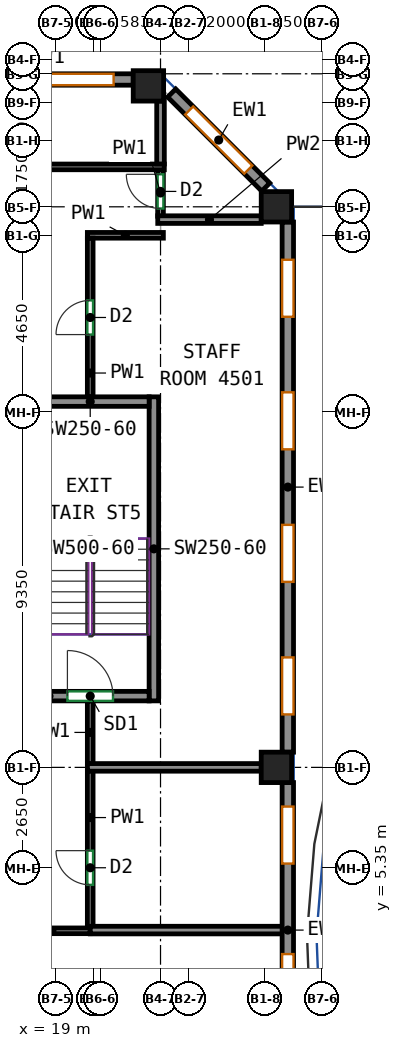
"""IFC4 building model, lengths in metres.
Left out: names, types, materials, properties, quantities, classifications, styles, units other than length and angle.
Written with IfcOpenShell. Run it as: python <this file> out.ifc"""

import sys

from ifc_helpers import new_model, si_unit, direction, frame, frame_2d, origin, origin_2d, place, context, subcontext, project, spatial, rectangle, extrude, source, transform, mapped, element, fill, save


model = new_model("IFC4")
c1 = context("Model", 3, precision=1e-05, world=origin(), true_north=direction((0.0, 1.0)))
c2 = subcontext(c1, "Body", "Model", "MODEL_VIEW")
j1 = project(units=[si_unit("LENGTHUNIT", "METRE"), si_unit("PLANEANGLEUNIT", "RADIAN")], contexts=[c1])
p1 = place(None, origin())
s1 = spatial("IfcSite", under=j1, at=p1, CompositionType="ELEMENT")
p2 = place(p1, origin())
s2 = spatial("IfcBuilding", under=s1, at=p2, CompositionType="ELEMENT")
p3 = place(p2, frame((0.0, 0.0, 188.9)))
s3 = spatial("IfcBuildingStorey", under=s2, at=p3, CompositionType="ELEMENT", Elevation=188.9)
m1 = source(origin(), c2, "Body", "SweptSolid", [
    extrude(rectangle(XDim=0.8, YDim=0.8, at=origin_2d()), origin(), (0.0, 0.0, 1.0), 3.12),
])
for number, where, z_axis, x_axis in (
    (1, (21.432, 25.932, 0.0), (0.0, 0.0, 1.0), (1.0, 0.0, 0.0)),
    (2, (24.8, 8.0, 0.0), (0.0, 0.0, 1.0), (1.0, 0.0, 0.0)),
    (3, (24.8, 22.75, 0.0), (0.0, 0.0, 1.0), (1.0, 0.0, 0.0)),
):
    element("IfcColumn", number, at=place(p3, frame(where, z_axis=z_axis, x_axis=x_axis)), inside=s3, PredefinedType="COLUMN", context=c2, shape_type="MappedRepresentation", body=[
        mapped(m1, transform((0.0, 0.0, 0.0))),
    ])
m2 = source(origin(), c2, "Body", "SweptSolid", [
    extrude(rectangle(XDim=8.0, YDim=0.25, at=frame_2d((4.0, 0.0))), origin(), (0.0, 0.0, 1.0), 3.12),
])
p4 = place(p3, frame((21.575, 9.75, 0.0), z_axis=(0.0, 0.0, 1.0), x_axis=(0.0, 1.0, 0.0)))
e4 = element("IfcWall", 4, at=p4, inside=s3, PredefinedType="SHEAR", context=c2, shape_type="MappedRepresentation", body=[
    mapped(m2, transform((0.0, 0.0, 0.0))),
])
m3 = source(origin(), c2, "Body", "SweptSolid", [
    extrude(rectangle(XDim=3.1, YDim=0.25, at=frame_2d((1.55, 0.0))), origin(), (0.0, 0.0, 1.0), 3.12),
])
p5 = place(p3, frame((18.35, 9.875, 0.0), z_axis=(0.0, 0.0, 1.0), x_axis=(1.0, 0.0, 0.0)))
e5 = element("IfcWall", 5, at=p5, inside=s3, PredefinedType="SHEAR", context=c2, shape_type="MappedRepresentation", body=[
    mapped(m3, transform((0.0, 0.0, 0.0))),
])
p6 = place(p5, frame((0.95, 0.0, 0.0)))
e6 = element("IfcOpeningElement", 6, at=p6, cuts=e5, PredefinedType="OPENING", context=c2, shape_type="SweptSolid", body=[
    extrude(rectangle(XDim=1.2, YDim=2.1, at=frame_2d((0.6, 1.05))), frame((0.0, 0.135, 0.0), z_axis=(0.0, -1.0, 0.0), x_axis=(1.0, 0.0, 0.0)), (0.0, 0.0, 1.0), 0.27),
])
p7 = place(p3, frame((18.35, 17.625, 0.0), z_axis=(0.0, 0.0, 1.0), x_axis=(1.0, 0.0, 0.0)))
e7 = element("IfcWall", 7, at=p7, inside=s3, PredefinedType="SHEAR", context=c2, shape_type="MappedRepresentation", body=[
    mapped(m3, transform((0.0, 0.0, 0.0))),
])
m4 = source(origin(), c2, "Body", "SweptSolid", [
    extrude(rectangle(XDim=7.763, YDim=0.3, at=frame_2d((3.881, 0.0))), origin(), (0.0, 0.0, 1.0), 3.12),
])
p8 = place(p3, frame((25.1, -0.163, 0.0), z_axis=(0.0, 0.0, 1.0), x_axis=(0.0, 1.0, 0.0)))
e8 = element("IfcWall", 8, at=p8, inside=s3, PredefinedType="SOLIDWALL", context=c2, shape_type="MappedRepresentation", body=[
    mapped(m4, transform((0.0, 0.0, 0.0))),
])
p9 = place(p8, frame((1.75, 0.0, 0.85)))
e9 = element("IfcOpeningElement", 9, at=p9, cuts=e8, PredefinedType="OPENING", context=c2, shape_type="SweptSolid", body=[
    extrude(rectangle(XDim=1.5, YDim=1.95, at=frame_2d((0.75, 0.975))), frame((0.0, 0.16, 0.0), z_axis=(0.0, -1.0, 0.0), x_axis=(1.0, 0.0, 0.0)), (0.0, 0.0, 1.0), 0.32),
])
p10 = place(p8, frame((5.631, 0.0, 0.85)))
e10 = element("IfcOpeningElement", 10, at=p10, cuts=e8, PredefinedType="OPENING", context=c2, shape_type="SweptSolid", body=[
    extrude(rectangle(XDim=1.5, YDim=1.95, at=frame_2d((0.75, 0.975))), frame((0.0, 0.16, 0.0), z_axis=(0.0, -1.0, 0.0), x_axis=(1.0, 0.0, 0.0)), (0.0, 0.0, 1.0), 0.32),
])
m5 = source(origin(), c2, "Body", "SweptSolid", [
    extrude(rectangle(XDim=13.95, YDim=0.3, at=frame_2d((6.975, 0.0))), origin(), (0.0, 0.0, 1.0), 3.12),
])
p11 = place(p3, frame((25.1, 8.4, 0.0), z_axis=(0.0, 0.0, 1.0), x_axis=(0.0, 1.0, 0.0)))
e11 = element("IfcWall", 11, at=p11, inside=s3, PredefinedType="SOLIDWALL", context=c2, shape_type="MappedRepresentation", body=[
    mapped(m5, transform((0.0, 0.0, 0.0))),
])
p12 = place(p11, frame((0.994, 0.0, 0.85)))
e12 = element("IfcOpeningElement", 12, at=p12, cuts=e11, PredefinedType="OPENING", context=c2, shape_type="SweptSolid", body=[
    extrude(rectangle(XDim=1.5, YDim=1.95, at=frame_2d((0.75, 0.975))), frame((0.0, 0.16, 0.0), z_axis=(0.0, -1.0, 0.0), x_axis=(1.0, 0.0, 0.0)), (0.0, 0.0, 1.0), 0.32),
])
p13 = place(p11, frame((4.481, 0.0, 0.85)))
e13 = element("IfcOpeningElement", 13, at=p13, cuts=e11, PredefinedType="OPENING", context=c2, shape_type="SweptSolid", body=[
    extrude(rectangle(XDim=1.5, YDim=1.95, at=frame_2d((0.75, 0.975))), frame((0.0, 0.16, 0.0), z_axis=(0.0, -1.0, 0.0), x_axis=(1.0, 0.0, 0.0)), (0.0, 0.0, 1.0), 0.32),
])
p14 = place(p11, frame((7.969, 0.0, 0.85)))
e14 = element("IfcOpeningElement", 14, at=p14, cuts=e11, PredefinedType="OPENING", context=c2, shape_type="SweptSolid", body=[
    extrude(rectangle(XDim=1.5, YDim=1.95, at=frame_2d((0.75, 0.975))), frame((0.0, 0.16, 0.0), z_axis=(0.0, -1.0, 0.0), x_axis=(1.0, 0.0, 0.0)), (0.0, 0.0, 1.0), 0.32),
])
p15 = place(p11, frame((11.456, 0.0, 0.85)))
e15 = element("IfcOpeningElement", 15, at=p15, cuts=e11, PredefinedType="OPENING", context=c2, shape_type="SweptSolid", body=[
    extrude(rectangle(XDim=1.5, YDim=1.95, at=frame_2d((0.75, 0.975))), frame((0.0, 0.16, 0.0), z_axis=(0.0, -1.0, 0.0), x_axis=(1.0, 0.0, 0.0)), (0.0, 0.0, 1.0), 0.32),
])
m6 = source(origin(), c2, "Body", "SweptSolid", [
    extrude(rectangle(XDim=3.5, YDim=0.3, at=frame_2d((1.75, 0.0))), origin(), (0.0, 0.0, 1.0), 3.12),
])
p16 = place(p3, frame((24.519, 23.269, 0.0), z_axis=(0.0, 0.0, 1.0), x_axis=(-0.70707190453, 0.707141656123, 0.0)))
e16 = element("IfcWall", 16, at=p16, inside=s3, PredefinedType="SOLIDWALL", context=c2, shape_type="MappedRepresentation", body=[
    mapped(m6, transform((0.0, 0.0, 0.0))),
])
p17 = place(p16, frame((0.65, 0.0, 0.85)))
e17 = element("IfcOpeningElement", 17, at=p17, cuts=e16, PredefinedType="OPENING", context=c2, shape_type="SweptSolid", body=[
    extrude(rectangle(XDim=2.2, YDim=1.95, at=frame_2d((1.1, 0.975))), frame((0.0, 0.16, 0.0), z_axis=(0.0, -1.0, 0.0), x_axis=(1.0, 0.0, 0.0)), (0.0, 0.0, 1.0), 0.32),
])
m7 = source(origin(), c2, "Body", "SweptSolid", [
    extrude(rectangle(XDim=6.465, YDim=0.3, at=frame_2d((3.232, 0.0))), origin(), (0.0, 0.0, 1.0), 3.12),
])
p18 = place(p3, frame((21.032, 26.1, 0.0), z_axis=(0.0, 0.0, 1.0), x_axis=(-1.0, 0.0, 0.0)))
e18 = element("IfcWall", 18, at=p18, inside=s3, PredefinedType="SOLIDWALL", context=c2, shape_type="MappedRepresentation", body=[
    mapped(m7, transform((0.0, 0.0, 0.0))),
])
p19 = place(p18, frame((0.516, 0.0, 0.85)))
e19 = element("IfcOpeningElement", 19, at=p19, cuts=e18, PredefinedType="OPENING", context=c2, shape_type="SweptSolid", body=[
    extrude(rectangle(XDim=2.2, YDim=1.95, at=frame_2d((1.1, 0.975))), frame((0.0, 0.16, 0.0), z_axis=(0.0, -1.0, 0.0), x_axis=(1.0, 0.0, 0.0)), (0.0, 0.0, 1.0), 0.32),
])
p20 = place(p18, frame((3.749, 0.0, 0.85)))
e20 = element("IfcOpeningElement", 20, at=p20, cuts=e18, PredefinedType="OPENING", context=c2, shape_type="SweptSolid", body=[
    extrude(rectangle(XDim=2.2, YDim=1.95, at=frame_2d((1.1, 0.975))), frame((0.0, 0.16, 0.0), z_axis=(0.0, -1.0, 0.0), x_axis=(1.0, 0.0, 0.0)), (0.0, 0.0, 1.0), 0.32),
])
p21 = place(p3, frame((19.9, 3.809, 0.0), z_axis=(0.0, 0.0, 1.0), x_axis=(0.0, 1.0, 0.0)))
e21 = element("IfcWall", 21, at=p21, inside=s3, PredefinedType="PARTITIONING", context=c2, shape_type="SweptSolid", body=[
    extrude(rectangle(XDim=4.101, YDim=0.15, at=frame_2d((2.05, 0.0))), origin(), (0.0, 0.0, 1.0), 3.12),
])
p22 = place(p21, frame((1.1, 0.0, 0.0)))
e22 = element("IfcOpeningElement", 22, at=p22, cuts=e21, PredefinedType="OPENING", context=c2, shape_type="SweptSolid", body=[
    extrude(rectangle(XDim=0.9, YDim=2.1, at=frame_2d((0.45, 1.05))), frame((0.0, 0.085, 0.0), z_axis=(0.0, -1.0, 0.0), x_axis=(1.0, 0.0, 0.0)), (0.0, 0.0, 1.0), 0.17),
])
p23 = place(p3, frame((19.825, 22.0, 0.0), z_axis=(0.0, 0.0, 1.0), x_axis=(1.0, 0.0, 0.0)))
e23 = element("IfcWall", 23, at=p23, inside=s3, PredefinedType="PARTITIONING", context=c2, shape_type="SweptSolid", body=[
    extrude(rectangle(XDim=2.0, YDim=0.15, at=frame_2d((1.0, 0.0))), origin(), (0.0, 0.0, 1.0), 3.12),
])
p24 = place(p3, frame((19.9, 17.75, 0.0), z_axis=(0.0, 0.0, 1.0), x_axis=(0.0, 1.0, 0.0)))
e24 = element("IfcWall", 24, at=p24, inside=s3, PredefinedType="PARTITIONING", context=c2, shape_type="SweptSolid", body=[
    extrude(rectangle(XDim=4.175, YDim=0.15, at=frame_2d((2.087, 0.0))), origin(), (0.0, 0.0, 1.0), 3.12),
])
p25 = place(p24, frame((1.638, 0.0, 0.0)))
e25 = element("IfcOpeningElement", 25, at=p25, cuts=e24, PredefinedType="OPENING", context=c2, shape_type="SweptSolid", body=[
    extrude(rectangle(XDim=0.9, YDim=2.1, at=frame_2d((0.45, 1.05))), frame((0.0, 0.085, 0.0), z_axis=(0.0, -1.0, 0.0), x_axis=(1.0, 0.0, 0.0)), (0.0, 0.0, 1.0), 0.17),
])
p26 = place(p3, frame((19.9, 8.09, 0.0), z_axis=(0.0, 0.0, 1.0), x_axis=(0.0, 1.0, 0.0)))
e26 = element("IfcWall", 26, at=p26, inside=s3, PredefinedType="PARTITIONING", context=c2, shape_type="SweptSolid", body=[
    extrude(rectangle(XDim=1.66, YDim=0.15, at=frame_2d((0.83, 0.0))), origin(), (0.0, 0.0, 1.0), 3.12),
])
p27 = place(p3, frame((21.75, 22.503, 0.0), z_axis=(0.0, 0.0, 1.0), x_axis=(0.0, 1.0, 0.0)))
e27 = element("IfcWall", 27, at=p27, inside=s3, PredefinedType="PARTITIONING", context=c2, shape_type="SweptSolid", body=[
    extrude(rectangle(XDim=1.222, YDim=0.15, at=frame_2d((0.611, 0.0))), origin(), (0.0, 0.0, 1.0), 3.12),
])
p28 = place(p27, frame((0.202, 0.0, 0.0)))
e28 = element("IfcOpeningElement", 28, at=p28, cuts=e27, PredefinedType="OPENING", context=c2, shape_type="SweptSolid", body=[
    extrude(rectangle(XDim=0.9, YDim=2.1, at=frame_2d((0.45, 1.05))), frame((0.0, 0.085, 0.0), z_axis=(0.0, -1.0, 0.0), x_axis=(1.0, 0.0, 0.0)), (0.0, 0.0, 1.0), 0.17),
])
p29 = place(p3, frame((17.884, 3.7, 0.0), z_axis=(0.0, 0.0, 1.0), x_axis=(1.0, 0.0, 0.0)))
e29 = element("IfcWall", 29, at=p29, inside=s3, PredefinedType="PARTITIONING", context=c2, shape_type="SweptSolid", body=[
    extrude(rectangle(XDim=2.016, YDim=0.15, at=frame_2d((1.008, 0.0))), origin(), (0.0, 0.0, 1.0), 3.12),
])
p30 = place(p3, frame((-20.059, 23.8, 0.0), z_axis=(0.0, 0.0, 1.0), x_axis=(1.0, 0.0, 0.0)))
e30 = element("IfcWall", 30, at=p30, inside=s3, PredefinedType="PARTITIONING", context=c2, shape_type="SweptSolid", body=[
    extrude(rectangle(XDim=41.909, YDim=0.15, at=frame_2d((20.955, 0.0))), origin(), (0.0, 0.0, 1.0), 3.12),
])
p31 = place(p30, frame((4.718, 0.0, 0.0)))
e31 = element("IfcOpeningElement", 31, at=p31, cuts=e30, PredefinedType="OPENING", context=c2, shape_type="SweptSolid", body=[
    extrude(rectangle(XDim=0.9, YDim=2.1, at=frame_2d((0.45, 1.05))), frame((0.0, 0.085, 0.0), z_axis=(0.0, -1.0, 0.0), x_axis=(1.0, 0.0, 0.0)), (0.0, 0.0, 1.0), 0.17),
])
p32 = place(p30, frame((30.079, 0.0, 0.0)))
e32 = element("IfcOpeningElement", 32, at=p32, cuts=e30, PredefinedType="OPENING", context=c2, shape_type="SweptSolid", body=[
    extrude(rectangle(XDim=1.0, YDim=2.1, at=frame_2d((0.5, 1.05))), frame((0.0, 0.085, 0.0), z_axis=(0.0, -1.0, 0.0), x_axis=(1.0, 0.0, 0.0)), (0.0, 0.0, 1.0), 0.17),
])
p33 = place(p3, frame((19.827, 8.0, 0.0), z_axis=(0.0, 0.0, 1.0), x_axis=(1.0, 0.0, 0.0)))
e33 = element("IfcWall", 33, at=p33, inside=s3, PredefinedType="PARTITIONING", context=c2, shape_type="SweptSolid", body=[
    extrude(rectangle(XDim=4.573, YDim=0.2, at=frame_2d((2.287, 0.0))), origin(), (0.0, 0.0, 1.0), 3.12),
])
p34 = place(p3, frame((19.902, 3.719, 0.0), z_axis=(0.0, 0.0, 1.0), x_axis=(1.0, 0.0, 0.0)))
e34 = element("IfcWall", 34, at=p34, inside=s3, PredefinedType="PARTITIONING", context=c2, shape_type="SweptSolid", body=[
    extrude(rectangle(XDim=5.098, YDim=0.2, at=frame_2d((2.549, 0.0))), origin(), (0.0, 0.0, 1.0), 3.12),
])
p35 = place(p3, frame((24.4, 22.413, 0.0), z_axis=(0.0, 0.0, 1.0), x_axis=(-1.0, 0.0, 0.0)))
e35 = element("IfcWall", 35, at=p35, inside=s3, PredefinedType="PARTITIONING", context=c2, shape_type="SweptSolid", body=[
    extrude(rectangle(XDim=2.723, YDim=0.2, at=frame_2d((1.361, 0.0))), origin(), (0.0, 0.0, 1.0), 2.52),
])
p36 = place(p3, frame((21.75, 25.532, 0.0), z_axis=(0.0, 0.0, 1.0), x_axis=(0.0, -1.0, 0.0)))
e36 = element("IfcWall", 36, at=p36, inside=s3, PredefinedType="PARTITIONING", context=c2, shape_type="SweptSolid", body=[
    extrude(rectangle(XDim=1.655, YDim=0.2, at=frame_2d((0.828, 0.0))), origin(), (0.0, 0.0, 1.0), 3.12),
])
p37 = place(p9, origin())
e37 = element("IfcWindow", 37, at=p37, inside=s3, PartitioningType="SINGLE_PANEL", PredefinedType="WINDOW", context=c2, shape_type="SweptSolid", body=[
    extrude(rectangle(XDim=1.5, YDim=1.95, at=frame_2d((0.75, 0.975))), frame((0.0, 0.03, 0.0), z_axis=(0.0, -1.0, 0.0), x_axis=(1.0, 0.0, 0.0)), (0.0, 0.0, 1.0), 0.06),
])
fill(e9, e37)
p38 = place(p10, origin())
e38 = element("IfcWindow", 38, at=p38, inside=s3, PartitioningType="SINGLE_PANEL", PredefinedType="WINDOW", context=c2, shape_type="SweptSolid", body=[
    extrude(rectangle(XDim=1.5, YDim=1.95, at=frame_2d((0.75, 0.975))), frame((0.0, 0.03, 0.0), z_axis=(0.0, -1.0, 0.0), x_axis=(1.0, 0.0, 0.0)), (0.0, 0.0, 1.0), 0.06),
])
fill(e10, e38)
p39 = place(p12, origin())
e39 = element("IfcWindow", 39, at=p39, inside=s3, PartitioningType="SINGLE_PANEL", PredefinedType="WINDOW", context=c2, shape_type="SweptSolid", body=[
    extrude(rectangle(XDim=1.5, YDim=1.95, at=frame_2d((0.75, 0.975))), frame((0.0, 0.03, 0.0), z_axis=(0.0, -1.0, 0.0), x_axis=(1.0, 0.0, 0.0)), (0.0, 0.0, 1.0), 0.06),
])
fill(e12, e39)
p40 = place(p13, origin())
e40 = element("IfcWindow", 40, at=p40, inside=s3, PartitioningType="SINGLE_PANEL", PredefinedType="WINDOW", context=c2, shape_type="SweptSolid", body=[
    extrude(rectangle(XDim=1.5, YDim=1.95, at=frame_2d((0.75, 0.975))), frame((0.0, 0.03, 0.0), z_axis=(0.0, -1.0, 0.0), x_axis=(1.0, 0.0, 0.0)), (0.0, 0.0, 1.0), 0.06),
])
fill(e13, e40)
p41 = place(p14, origin())
e41 = element("IfcWindow", 41, at=p41, inside=s3, PartitioningType="SINGLE_PANEL", PredefinedType="WINDOW", context=c2, shape_type="SweptSolid", body=[
    extrude(rectangle(XDim=1.5, YDim=1.95, at=frame_2d((0.75, 0.975))), frame((0.0, 0.03, 0.0), z_axis=(0.0, -1.0, 0.0), x_axis=(1.0, 0.0, 0.0)), (0.0, 0.0, 1.0), 0.06),
])
fill(e14, e41)
p42 = place(p15, origin())
e42 = element("IfcWindow", 42, at=p42, inside=s3, PartitioningType="SINGLE_PANEL", PredefinedType="WINDOW", context=c2, shape_type="SweptSolid", body=[
    extrude(rectangle(XDim=1.5, YDim=1.95, at=frame_2d((0.75, 0.975))), frame((0.0, 0.03, 0.0), z_axis=(0.0, -1.0, 0.0), x_axis=(1.0, 0.0, 0.0)), (0.0, 0.0, 1.0), 0.06),
])
fill(e15, e42)
p43 = place(p17, origin())
e43 = element("IfcWindow", 43, at=p43, inside=s3, PartitioningType="SINGLE_PANEL", PredefinedType="WINDOW", context=c2, shape_type="SweptSolid", body=[
    extrude(rectangle(XDim=2.2, YDim=1.95, at=frame_2d((1.1, 0.975))), frame((0.0, 0.03, 0.0), z_axis=(0.0, -1.0, 0.0), x_axis=(1.0, 0.0, 0.0)), (0.0, 0.0, 1.0), 0.06),
])
fill(e17, e43)
p44 = place(p19, origin())
e44 = element("IfcWindow", 44, at=p44, inside=s3, PartitioningType="SINGLE_PANEL", PredefinedType="WINDOW", context=c2, shape_type="SweptSolid", body=[
    extrude(rectangle(XDim=2.2, YDim=1.95, at=frame_2d((1.1, 0.975))), frame((0.0, 0.03, 0.0), z_axis=(0.0, -1.0, 0.0), x_axis=(1.0, 0.0, 0.0)), (0.0, 0.0, 1.0), 0.06),
])
fill(e19, e44)
p45 = place(p6, origin())
e45 = element("IfcDoor", 45, at=p45, inside=s3, OperationType="DOUBLE_DOOR_SINGLE_SWING", PredefinedType="DOOR", context=c2, shape_type="SweptSolid", body=[
    extrude(rectangle(XDim=1.2, YDim=2.1, at=frame_2d((0.6, 1.05))), frame((0.0, 0.025, 0.0), z_axis=(0.0, -1.0, 0.0), x_axis=(1.0, 0.0, 0.0)), (0.0, 0.0, 1.0), 0.05),
])
fill(e6, e45)
p46 = place(p22, origin())
e46 = element("IfcDoor", 46, at=p46, inside=s3, OperationType="SINGLE_SWING_RIGHT", PredefinedType="DOOR", context=c2, shape_type="SweptSolid", body=[
    extrude(rectangle(XDim=0.9, YDim=2.1, at=frame_2d((0.45, 1.05))), frame((0.0, 0.025, 0.0), z_axis=(0.0, -1.0, 0.0), x_axis=(1.0, 0.0, 0.0)), (0.0, 0.0, 1.0), 0.05),
])
fill(e22, e46)
p47 = place(p25, origin())
e47 = element("IfcDoor", 47, at=p47, inside=s3, OperationType="SINGLE_SWING_LEFT", PredefinedType="DOOR", context=c2, shape_type="SweptSolid", body=[
    extrude(rectangle(XDim=0.9, YDim=2.1, at=frame_2d((0.45, 1.05))), frame((0.0, 0.025, 0.0), z_axis=(0.0, -1.0, 0.0), x_axis=(1.0, 0.0, 0.0)), (0.0, 0.0, 1.0), 0.05),
])
fill(e25, e47)
p48 = place(p28, origin())
e48 = element("IfcDoor", 48, at=p48, inside=s3, OperationType="SINGLE_SWING_RIGHT", PredefinedType="DOOR", context=c2, shape_type="SweptSolid", body=[
    extrude(rectangle(XDim=0.9, YDim=2.1, at=frame_2d((0.45, 1.05))), frame((0.0, 0.025, 0.0), z_axis=(0.0, -1.0, 0.0), x_axis=(1.0, 0.0, 0.0)), (0.0, 0.0, 1.0), 0.05),
])
fill(e28, e48)
save(model, sys.argv[1])
